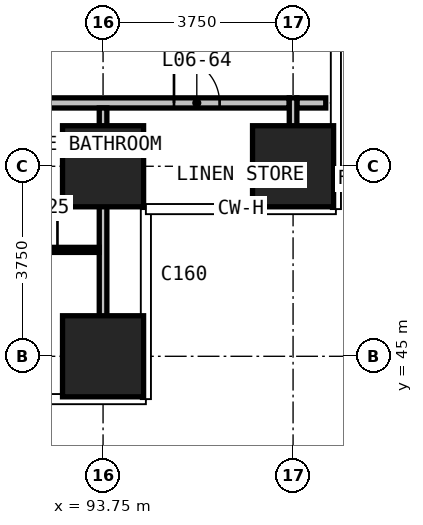
"""IFC4 building model, lengths in metres.
Left out: names, types, materials, properties, quantities, classifications, styles, units other than length and angle.
Written with IfcOpenShell. Run it as: python <this file> out.ifc"""

import sys

from ifc_helpers import new_model, si_unit, direction, frame, frame_2d, origin, origin_2d, place, context, subcontext, project, spatial, rectangle, extrude, element, fill, save


model = new_model("IFC4")
c1 = context("Model", 3, precision=1e-05, world=origin(), true_north=direction((0.0, 1.0)))
c2 = subcontext(c1, "Body", "Model", "MODEL_VIEW")
j1 = project(units=[si_unit("LENGTHUNIT", "METRE"), si_unit("PLANEANGLEUNIT", "RADIAN")], contexts=[c1])
p1 = place(None, origin())
s1 = spatial("IfcSite", under=j1, at=p1, CompositionType="ELEMENT")
p2 = place(p1, origin())
s2 = spatial("IfcBuilding", under=s1, at=p2, CompositionType="ELEMENT")
p3 = place(p2, frame((0.0, 0.0, 39.5)))
s3 = spatial("IfcBuildingStorey", under=s2, at=p3, CompositionType="ELEMENT", Elevation=39.5)
for number, where, z_axis, x_axis in (
    (1, (93.75, 45.0, 0.0), (0.0, 0.0, 1.0), (1.0, 0.0, 0.0)),
    (2, (93.75, 48.75, 0.0), (0.0, 0.0, 1.0), (1.0, 0.0, 0.0)),
    (3, (97.5, 48.75, 0.0), (0.0, 0.0, 1.0), (1.0, 0.0, 0.0)),
):
    element("IfcColumn", number, at=place(p3, frame(where, z_axis=z_axis, x_axis=x_axis)), inside=s3, PredefinedType="COLUMN", context=c2, shape_type="SweptSolid", body=[
        extrude(rectangle(XDim=1.6, YDim=1.6, at=origin_2d()), origin(), (0.0, 0.0, 1.0), 3.3),
    ])
p4 = place(p3, frame((52.575, 50.0, 0.0), z_axis=(0.0, 0.0, 1.0), x_axis=(1.0, 0.0, 0.0)))
e4 = element("IfcWall", 4, at=p4, inside=s3, PredefinedType="PARTITIONING", context=c2, shape_type="SweptSolid", body=[
    extrude(rectangle(XDim=44.85, YDim=0.2, at=frame_2d((22.425, 0.0))), origin(), (0.0, 0.0, 1.0), 3.0),
])
p5 = place(p4, frame((5.925, 0.0, 0.0)))
e5 = element("IfcOpeningElement", 5, at=p5, cuts=e4, PredefinedType="OPENING", context=c2, shape_type="SweptSolid", body=[
    extrude(rectangle(XDim=1.0, YDim=2.2, at=frame_2d((0.5, 1.1))), frame((0.0, 0.11, 0.0), z_axis=(0.0, -1.0, 0.0), x_axis=(1.0, 0.0, 0.0)), (0.0, 0.0, 1.0), 0.22),
])
p6 = place(p4, frame((7.925, 0.0, 0.0)))
e6 = element("IfcOpeningElement", 6, at=p6, cuts=e4, PredefinedType="OPENING", context=c2, shape_type="SweptSolid", body=[
    extrude(rectangle(XDim=1.0, YDim=2.2, at=frame_2d((0.5, 1.1))), frame((0.0, 0.11, 0.0), z_axis=(0.0, -1.0, 0.0), x_axis=(1.0, 0.0, 0.0)), (0.0, 0.0, 1.0), 0.22),
])
p7 = place(p4, frame((13.425, 0.0, 0.0)))
e7 = element("IfcOpeningElement", 7, at=p7, cuts=e4, PredefinedType="OPENING", context=c2, shape_type="SweptSolid", body=[
    extrude(rectangle(XDim=1.0, YDim=2.2, at=frame_2d((0.5, 1.1))), frame((0.0, 0.11, 0.0), z_axis=(0.0, -1.0, 0.0), x_axis=(1.0, 0.0, 0.0)), (0.0, 0.0, 1.0), 0.22),
])
p8 = place(p4, frame((15.425, 0.0, 0.0)))
e8 = element("IfcOpeningElement", 8, at=p8, cuts=e4, PredefinedType="OPENING", context=c2, shape_type="SweptSolid", body=[
    extrude(rectangle(XDim=1.0, YDim=2.2, at=frame_2d((0.5, 1.1))), frame((0.0, 0.11, 0.0), z_axis=(0.0, -1.0, 0.0), x_axis=(1.0, 0.0, 0.0)), (0.0, 0.0, 1.0), 0.22),
])
p9 = place(p4, frame((20.925, 0.0, 0.0)))
e9 = element("IfcOpeningElement", 9, at=p9, cuts=e4, PredefinedType="OPENING", context=c2, shape_type="SweptSolid", body=[
    extrude(rectangle(XDim=1.0, YDim=2.2, at=frame_2d((0.5, 1.1))), frame((0.0, 0.11, 0.0), z_axis=(0.0, -1.0, 0.0), x_axis=(1.0, 0.0, 0.0)), (0.0, 0.0, 1.0), 0.22),
])
p10 = place(p4, frame((22.925, 0.0, 0.0)))
e10 = element("IfcOpeningElement", 10, at=p10, cuts=e4, PredefinedType="OPENING", context=c2, shape_type="SweptSolid", body=[
    extrude(rectangle(XDim=1.0, YDim=2.2, at=frame_2d((0.5, 1.1))), frame((0.0, 0.11, 0.0), z_axis=(0.0, -1.0, 0.0), x_axis=(1.0, 0.0, 0.0)), (0.0, 0.0, 1.0), 0.22),
])
p11 = place(p4, frame((28.425, 0.0, 0.0)))
e11 = element("IfcOpeningElement", 11, at=p11, cuts=e4, PredefinedType="OPENING", context=c2, shape_type="SweptSolid", body=[
    extrude(rectangle(XDim=1.0, YDim=2.2, at=frame_2d((0.5, 1.1))), frame((0.0, 0.11, 0.0), z_axis=(0.0, -1.0, 0.0), x_axis=(1.0, 0.0, 0.0)), (0.0, 0.0, 1.0), 0.22),
])
p12 = place(p4, frame((30.425, 0.0, 0.0)))
e12 = element("IfcOpeningElement", 12, at=p12, cuts=e4, PredefinedType="OPENING", context=c2, shape_type="SweptSolid", body=[
    extrude(rectangle(XDim=1.0, YDim=2.2, at=frame_2d((0.5, 1.1))), frame((0.0, 0.11, 0.0), z_axis=(0.0, -1.0, 0.0), x_axis=(1.0, 0.0, 0.0)), (0.0, 0.0, 1.0), 0.22),
])
p13 = place(p4, frame((35.925, 0.0, 0.0)))
e13 = element("IfcOpeningElement", 13, at=p13, cuts=e4, PredefinedType="OPENING", context=c2, shape_type="SweptSolid", body=[
    extrude(rectangle(XDim=1.0, YDim=2.2, at=frame_2d((0.5, 1.1))), frame((0.0, 0.11, 0.0), z_axis=(0.0, -1.0, 0.0), x_axis=(1.0, 0.0, 0.0)), (0.0, 0.0, 1.0), 0.22),
])
p14 = place(p4, frame((37.925, 0.0, 0.0)))
e14 = element("IfcOpeningElement", 14, at=p14, cuts=e4, PredefinedType="OPENING", context=c2, shape_type="SweptSolid", body=[
    extrude(rectangle(XDim=1.0, YDim=2.2, at=frame_2d((0.5, 1.1))), frame((0.0, 0.11, 0.0), z_axis=(0.0, -1.0, 0.0), x_axis=(1.0, 0.0, 0.0)), (0.0, 0.0, 1.0), 0.22),
])
p15 = place(p4, frame((1.4, 0.0, 0.0)))
e15 = element("IfcOpeningElement", 15, at=p15, cuts=e4, PredefinedType="OPENING", context=c2, shape_type="SweptSolid", body=[
    extrude(rectangle(XDim=0.9, YDim=2.2, at=frame_2d((0.45, 1.1))), frame((0.0, 0.11, 0.0), z_axis=(0.0, -1.0, 0.0), x_axis=(1.0, 0.0, 0.0)), (0.0, 0.0, 1.0), 0.22),
])
p16 = place(p4, frame((42.575, 0.0, 0.0)))
e16 = element("IfcOpeningElement", 16, at=p16, cuts=e4, PredefinedType="OPENING", context=c2, shape_type="SweptSolid", body=[
    extrude(rectangle(XDim=0.9, YDim=2.2, at=frame_2d((0.45, 1.1))), frame((0.0, 0.11, 0.0), z_axis=(0.0, -1.0, 0.0), x_axis=(1.0, 0.0, 0.0)), (0.0, 0.0, 1.0), 0.22),
])
p17 = place(p3, frame((97.575, 50.0, 0.0), z_axis=(0.0, 0.0, 1.0), x_axis=(1.0, 0.0, 0.0)))
e17 = element("IfcWall", 17, at=p17, inside=s3, PredefinedType="PARTITIONING", context=c2, shape_type="SweptSolid", body=[
    extrude(rectangle(XDim=0.57, YDim=0.2, at=frame_2d((0.285, 0.0))), origin(), (0.0, 0.0, 1.0), 3.0),
])
p18 = place(p3, frame((93.75, 44.235, 0.0), z_axis=(0.0, 0.0, 1.0), x_axis=(0.0, 1.0, 0.0)))
e18 = element("IfcWall", 18, at=p18, inside=s3, PredefinedType="PARTITIONING", context=c2, shape_type="SweptSolid", body=[
    extrude(rectangle(XDim=5.665, YDim=0.15, at=frame_2d((2.833, 0.0))), origin(), (0.0, 0.0, 1.0), 3.0),
])
p19 = place(p3, frame((97.5, 48.105, 0.0), z_axis=(0.0, 0.0, 1.0), x_axis=(0.0, 1.0, 0.0)))
e19 = element("IfcWall", 19, at=p19, inside=s3, PredefinedType="PARTITIONING", context=c2, shape_type="SweptSolid", body=[
    extrude(rectangle(XDim=1.995, YDim=0.15, at=frame_2d((0.998, 0.0))), origin(), (0.0, 0.0, 1.0), 3.0),
])
p20 = place(p3, frame((91.8, 47.1, 0.0), z_axis=(0.0, 0.0, 1.0), x_axis=(1.0, 0.0, 0.0)))
e20 = element("IfcWall", 20, at=p20, inside=s3, PredefinedType="PARTITIONING", context=c2, shape_type="SweptSolid", body=[
    extrude(rectangle(XDim=1.875, YDim=0.1, at=frame_2d((0.938, 0.0))), origin(), (0.0, 0.0, 1.0), 3.0),
])
p21 = place(p20, frame((0.15, 0.0, 0.0)))
e21 = element("IfcOpeningElement", 21, at=p21, cuts=e20, PredefinedType="OPENING", context=c2, shape_type="SweptSolid", body=[
    extrude(rectangle(XDim=0.9, YDim=2.2, at=frame_2d((0.45, 1.1))), frame((0.0, 0.06, 0.0), z_axis=(0.0, -1.0, 0.0), x_axis=(1.0, 0.0, 0.0)), (0.0, 0.0, 1.0), 0.12),
])
p22 = place(p21, origin())
e22 = element("IfcDoor", 22, at=p22, inside=s3, OperationType="SINGLE_SWING_RIGHT", PredefinedType="DOOR", context=c2, shape_type="SweptSolid", body=[
    extrude(rectangle(XDim=0.9, YDim=2.2, at=frame_2d((0.45, 1.1))), frame((0.0, 0.025, 0.0), z_axis=(0.0, -1.0, 0.0), x_axis=(1.0, 0.0, 0.0)), (0.0, 0.0, 1.0), 0.05),
])
fill(e21, e22)
p23 = place(p16, origin())
e23 = element("IfcDoor", 23, at=p23, inside=s3, OperationType="SINGLE_SWING_LEFT", PredefinedType="DOOR", context=c2, shape_type="SweptSolid", body=[
    extrude(rectangle(XDim=0.9, YDim=2.2, at=frame_2d((0.45, 1.1))), frame((0.0, 0.025, 0.0), z_axis=(0.0, -1.0, 0.0), x_axis=(1.0, 0.0, 0.0)), (0.0, 0.0, 1.0), 0.05),
])
fill(e16, e23)
save(model, sys.argv[1])
